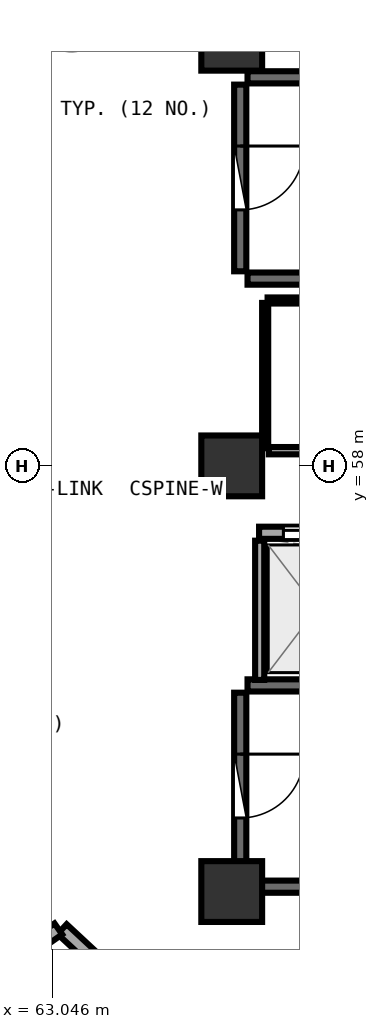
"""IFC4 building model, lengths in metres.
Left out: names, types, materials, properties, quantities, classifications, styles, units other than length and angle.
Written with IfcOpenShell. Run it as: python <this file> out.ifc"""

import sys

from ifc_helpers import new_model, si_unit, direction, frame, frame_2d, origin, origin_2d, place, context, subcontext, project, spatial, rectangle, extrude, element, fill, save


model = new_model("IFC4")
c1 = context("Model", 3, precision=1e-05, world=origin(), true_north=direction((0.0, 1.0)))
c2 = subcontext(c1, "Body", "Model", "MODEL_VIEW")
j1 = project(units=[si_unit("LENGTHUNIT", "METRE"), si_unit("PLANEANGLEUNIT", "RADIAN")], contexts=[c1])
p1 = place(None, origin())
s1 = spatial("IfcSite", under=j1, at=p1, CompositionType="ELEMENT")
p2 = place(p1, origin())
s2 = spatial("IfcBuilding", under=s1, at=p2, CompositionType="ELEMENT")
p3 = place(p2, frame((0.0, 0.0, 226.95)))
s3 = spatial("IfcBuildingStorey", under=s2, at=p3, CompositionType="ELEMENT", Elevation=226.95)
for number, where, z_axis, x_axis in (
    (1, (66.0, 51.0, 0.0), (0.0, 0.0, 1.0), (1.0, 0.0, 0.0)),
    (2, (66.0, 65.0, 0.0), (0.0, 0.0, 1.0), (1.0, 0.0, 0.0)),
    (3, (66.0, 58.0, 0.0), (0.0, 0.0, 1.0), (1.0, 0.0, 0.0)),
):
    element("IfcColumn", number, at=place(p3, frame(where, z_axis=z_axis, x_axis=x_axis)), inside=s3, PredefinedType="PILASTER", context=c2, shape_type="SweptSolid", body=[
        extrude(rectangle(XDim=1.0, YDim=1.0, at=origin_2d()), origin(), (0.0, 0.0, 1.0), 3.75),
    ])
for number, where, z_axis, x_axis in (
    (4, (66.26, 61.08, 0.0), (0.0, 0.0, 1.0), (1.0, 0.0, 0.0)),
    (5, (73.42, 64.39, 0.0), (0.0, 0.0, 1.0), (-1.0, 0.0, 0.0)),
):
    element("IfcWall", number, at=place(p3, frame(where, z_axis=z_axis, x_axis=x_axis)), inside=s3, PredefinedType="SHEAR", context=c2, shape_type="SweptSolid", body=[
        extrude(rectangle(XDim=7.16, YDim=0.2, at=frame_2d((3.58, 0.0))), origin(), (0.0, 0.0, 1.0), 3.49),
    ])
p4 = place(p3, frame((66.14, 64.27, 0.0), z_axis=(0.0, 0.0, 1.0), x_axis=(0.0, -1.0, 0.0)))
e6 = element("IfcWall", 6, at=p4, inside=s3, PredefinedType="SHEAR", context=c2, shape_type="SweptSolid", body=[
    extrude(rectangle(XDim=3.07, YDim=0.2, at=frame_2d((1.535, 0.0))), origin(), (0.0, 0.0, 1.0), 3.49),
])
p5 = place(p4, frame((1.01, 0.0, 0.0)))
e7 = element("IfcOpeningElement", 7, at=p5, cuts=e6, PredefinedType="OPENING", context=c2, shape_type="SweptSolid", body=[
    extrude(rectangle(XDim=1.05, YDim=2.1, at=frame_2d((0.525, 1.05))), frame((0.0, 0.11, 0.0), z_axis=(0.0, -1.0, 0.0), x_axis=(1.0, 0.0, 0.0)), (0.0, 0.0, 1.0), 0.22),
])
for number, where, z_axis, x_axis in (
    (8, (66.26, 51.08, 0.0), (0.0, 0.0, 1.0), (1.0, 0.0, 0.0)),
    (9, (73.42, 54.39, 0.0), (0.0, 0.0, 1.0), (-1.0, 0.0, 0.0)),
):
    element("IfcWall", number, at=place(p3, frame(where, z_axis=z_axis, x_axis=x_axis)), inside=s3, PredefinedType="SHEAR", context=c2, shape_type="SweptSolid", body=[
        extrude(rectangle(XDim=7.16, YDim=0.2, at=frame_2d((3.58, 0.0))), origin(), (0.0, 0.0, 1.0), 3.49),
    ])
p6 = place(p3, frame((66.14, 54.27, 0.0), z_axis=(0.0, 0.0, 1.0), x_axis=(0.0, -1.0, 0.0)))
e10 = element("IfcWall", 10, at=p6, inside=s3, PredefinedType="SHEAR", context=c2, shape_type="SweptSolid", body=[
    extrude(rectangle(XDim=3.07, YDim=0.2, at=frame_2d((1.535, 0.0))), origin(), (0.0, 0.0, 1.0), 3.49),
])
p7 = place(p6, frame((1.01, 0.0, 0.0)))
e11 = element("IfcOpeningElement", 11, at=p7, cuts=e10, PredefinedType="OPENING", context=c2, shape_type="SweptSolid", body=[
    extrude(rectangle(XDim=1.05, YDim=2.1, at=frame_2d((0.525, 1.05))), frame((0.0, 0.11, 0.0), z_axis=(0.0, -1.0, 0.0), x_axis=(1.0, 0.0, 0.0)), (0.0, 0.0, 1.0), 0.22),
])
p8 = place(p3, frame((66.45, 56.9, 0.0), z_axis=(0.0, 0.0, 1.0), x_axis=(1.0, 0.0, 0.0)))
e12 = element("IfcWall", 12, at=p8, inside=s3, PredefinedType="SOLIDWALL", context=c2, shape_type="SweptSolid", body=[
    extrude(rectangle(XDim=14.4, YDim=0.2, at=frame_2d((7.2, 0.0))), origin(), (0.0, 0.0, 1.0), 3.48),
])
p9 = place(p8, frame((0.4, 0.0, 0.0)))
e13 = element("IfcOpeningElement", 13, at=p9, cuts=e12, PredefinedType="OPENING", context=c2, shape_type="SweptSolid", body=[
    extrude(rectangle(XDim=1.1, YDim=2.1, at=frame_2d((0.55, 1.05))), frame((0.0, 0.11, 0.0), z_axis=(0.0, -1.0, 0.0), x_axis=(1.0, 0.0, 0.0)), (0.0, 0.0, 1.0), 0.22),
])
p10 = place(p8, frame((2.4, 0.0, 0.0)))
e14 = element("IfcOpeningElement", 14, at=p10, cuts=e12, PredefinedType="OPENING", context=c2, shape_type="SweptSolid", body=[
    extrude(rectangle(XDim=1.1, YDim=2.1, at=frame_2d((0.55, 1.05))), frame((0.0, 0.11, 0.0), z_axis=(0.0, -1.0, 0.0), x_axis=(1.0, 0.0, 0.0)), (0.0, 0.0, 1.0), 0.22),
])
p11 = place(p8, frame((4.4, 0.0, 0.0)))
e15 = element("IfcOpeningElement", 15, at=p11, cuts=e12, PredefinedType="OPENING", context=c2, shape_type="SweptSolid", body=[
    extrude(rectangle(XDim=1.1, YDim=2.1, at=frame_2d((0.55, 1.05))), frame((0.0, 0.11, 0.0), z_axis=(0.0, -1.0, 0.0), x_axis=(1.0, 0.0, 0.0)), (0.0, 0.0, 1.0), 0.22),
])
p12 = place(p3, frame((66.46, 54.48, 0.0), z_axis=(0.0, 0.0, 1.0), x_axis=(0.0, 1.0, 0.0)))
e16 = element("IfcWall", 16, at=p12, inside=s3, PredefinedType="PARTITIONING", context=c2, shape_type="SweptSolid", body=[
    extrude(rectangle(XDim=2.29, YDim=0.15, at=frame_2d((1.145, 0.0))), origin(), (0.0, 0.0, 1.0), 3.48),
])
p13 = place(p3, frame((66.61, 58.25, 0.0), z_axis=(0.0, 0.0, 1.0), x_axis=(1.0, 0.0, 0.0)))
e17 = element("IfcWall", 17, at=p13, inside=s3, PredefinedType="PARTITIONING", context=c2, shape_type="SweptSolid", body=[
    extrude(rectangle(XDim=3.33, YDim=0.12, at=frame_2d((1.665, 0.0))), origin(), (0.0, 0.0, 1.0), 3.48),
])
p14 = place(p13, frame((1.215, 0.0, 0.0)))
e18 = element("IfcOpeningElement", 18, at=p14, cuts=e17, PredefinedType="OPENING", context=c2, shape_type="SweptSolid", body=[
    extrude(rectangle(XDim=0.9, YDim=2.08, at=frame_2d((0.45, 1.04))), frame((0.0, 0.07, 0.0), z_axis=(0.0, -1.0, 0.0), x_axis=(1.0, 0.0, 0.0)), (0.0, 0.0, 1.0), 0.14),
])
p15 = place(p3, frame((63.6, 66.044, 0.0), z_axis=(0.0, 0.0, 1.0), x_axis=(-0.642238304801, -0.766505029238, 0.0)))
e19 = element("IfcWall", 19, at=p15, inside=s3, PredefinedType="PARTITIONING", context=c2, shape_type="SweptSolid", body=[
    extrude(rectangle(XDim=1.682, YDim=0.15, at=frame_2d((0.841, 0.0))), origin(), (0.0, 0.0, 1.0), 3.025),
])
p16 = place(p15, frame((0.366, 0.0, 0.0)))
e20 = element("IfcOpeningElement", 20, at=p16, cuts=e19, PredefinedType="OPENING", context=c2, shape_type="SweptSolid", body=[
    extrude(rectangle(XDim=0.95, YDim=2.08, at=frame_2d((0.475, 1.04))), frame((0.0, 0.085, 0.0), z_axis=(0.0, -1.0, 0.0), x_axis=(1.0, 0.0, 0.0)), (0.0, 0.0, 1.0), 0.17),
])
p17 = place(p3, frame((69.96, 60.72, 0.0), z_axis=(0.0, 0.0, 1.0), x_axis=(-1.0, 0.0, 0.0)))
e21 = element("IfcWall", 21, at=p17, inside=s3, PredefinedType="PARTITIONING", context=c2, shape_type="SweptSolid", body=[
    extrude(rectangle(XDim=3.37, YDim=0.1, at=frame_2d((1.685, 0.0))), origin(), (0.0, 0.0, 1.0), 3.48),
])
p18 = place(p3, frame((66.55, 60.68, 0.0), z_axis=(0.0, 0.0, 1.0), x_axis=(0.0, -1.0, 0.0)))
e22 = element("IfcWall", 22, at=p18, inside=s3, PredefinedType="PARTITIONING", context=c2, shape_type="SweptSolid", body=[
    extrude(rectangle(XDim=2.39, YDim=0.1, at=frame_2d((1.195, 0.0))), origin(), (0.0, 0.0, 1.0), 3.48),
])
p19 = place(p3, frame((63.21, 50.382, 0.0), z_axis=(0.0, 0.0, 1.0), x_axis=(0.732365628242, -0.680911584987, 0.0)))
e23 = element("IfcWall", 23, at=p19, inside=s3, PredefinedType="SOLIDWALL", context=c2, shape_type="SweptSolid", body=[
    extrude(rectangle(XDim=2.643, YDim=0.22, at=frame_2d((1.321, 0.0))), origin(), (0.0, 0.0, 1.0), 3.025),
])
p20 = place(p3, frame((56.949, 46.03, 0.0), z_axis=(0.0, 0.0, 1.0), x_axis=(0.818217914941, 0.574908204559, 0.0)))
e24 = element("IfcWall", 24, at=p20, inside=s3, PredefinedType="SOLIDWALL", context=c2, shape_type="SweptSolid", body=[
    extrude(rectangle(XDim=7.577, YDim=0.22, at=frame_2d((3.789, 0.0))), origin(), (0.0, 0.0, 1.0), 3.075),
])
p21 = place(p5, origin())
e25 = element("IfcDoor", 25, at=p21, inside=s3, OperationType="SINGLE_SWING_LEFT", PredefinedType="DOOR", context=c2, shape_type="SweptSolid", body=[
    extrude(rectangle(XDim=1.05, YDim=2.1, at=frame_2d((0.525, 1.05))), frame((0.0, 0.025, 0.0), z_axis=(0.0, -1.0, 0.0), x_axis=(1.0, 0.0, 0.0)), (0.0, 0.0, 1.0), 0.05),
])
fill(e7, e25)
p22 = place(p7, origin())
e26 = element("IfcDoor", 26, at=p22, inside=s3, OperationType="SINGLE_SWING_LEFT", PredefinedType="DOOR", context=c2, shape_type="SweptSolid", body=[
    extrude(rectangle(XDim=1.05, YDim=2.1, at=frame_2d((0.525, 1.05))), frame((0.0, 0.025, 0.0), z_axis=(0.0, -1.0, 0.0), x_axis=(1.0, 0.0, 0.0)), (0.0, 0.0, 1.0), 0.05),
])
fill(e11, e26)
p23 = place(p9, origin())
e27 = element("IfcDoor", 27, at=p23, inside=s3, OperationType="DOUBLE_DOOR_SLIDING", PredefinedType="DOOR", context=c2, shape_type="SweptSolid", body=[
    extrude(rectangle(XDim=1.1, YDim=2.1, at=frame_2d((0.55, 1.05))), frame((0.0, 0.025, 0.0), z_axis=(0.0, -1.0, 0.0), x_axis=(1.0, 0.0, 0.0)), (0.0, 0.0, 1.0), 0.05),
])
fill(e13, e27)
save(model, sys.argv[1])
